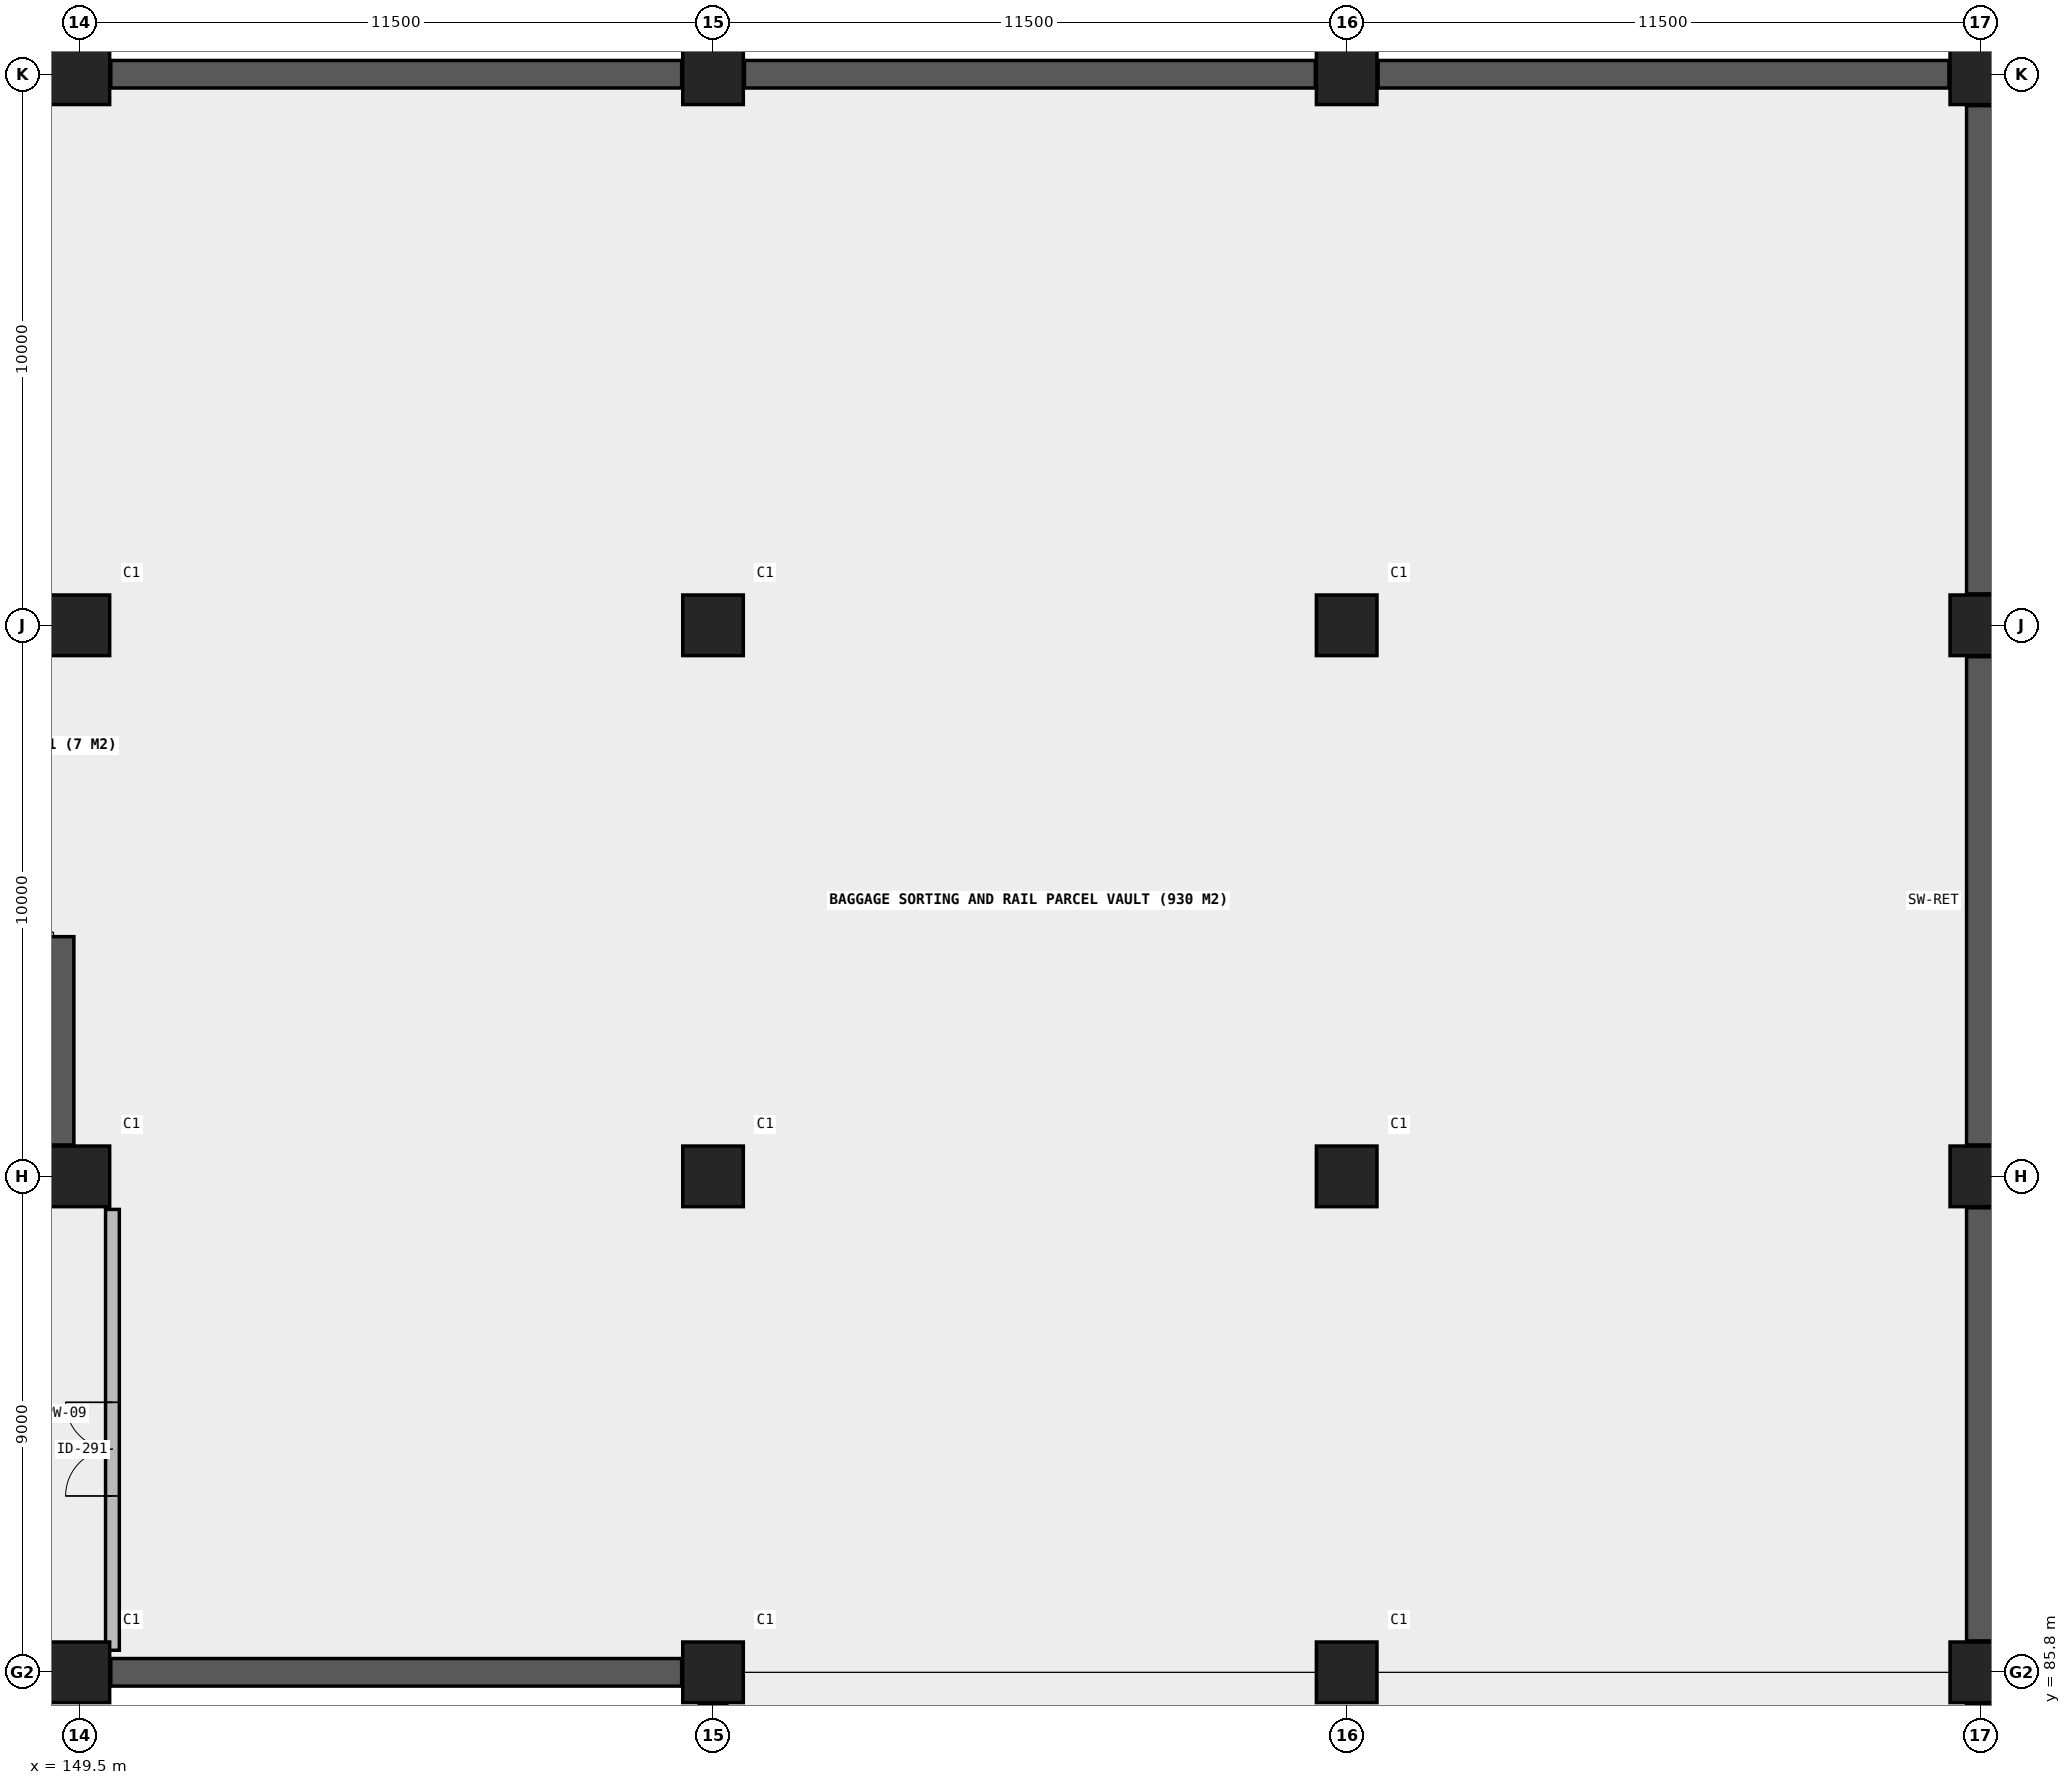
"""IFC4 building model, lengths in metres.
Left out: names, types, materials, properties, quantities, classifications, styles, units other than length and angle.
Written with IfcOpenShell. Run it as: python <this file> out.ifc"""

import sys

from ifc_helpers import new_model, si_unit, direction, frame, frame_2d, origin, origin_2d, place, context, subcontext, project, spatial, rectangle, extrude, element, fill, save


model = new_model("IFC4")
c1 = context("Model", 3, precision=1e-05, world=origin(), true_north=direction((0.0, 1.0)))
c2 = subcontext(c1, "Body", "Model", "MODEL_VIEW")
j1 = project(units=[si_unit("LENGTHUNIT", "METRE"), si_unit("PLANEANGLEUNIT", "RADIAN")], contexts=[c1])
p1 = place(None, origin())
s1 = spatial("IfcSite", under=j1, at=p1, CompositionType="ELEMENT")
p2 = place(p1, origin())
s2 = spatial("IfcBuilding", under=s1, at=p2, CompositionType="ELEMENT")
p3 = place(p2, frame((0.0, 0.0, -4.2)))
s3 = spatial("IfcBuildingStorey", under=s2, at=p3, CompositionType="ELEMENT", Elevation=-4.2)
for number, where, z_axis, x_axis in (
    (1, (149.5, 85.8, 0.0), (0.0, 0.0, 1.0), (1.0, 0.0, 0.0)),
    (2, (149.5, 94.8, 0.0), (0.0, 0.0, 1.0), (1.0, 0.0, 0.0)),
    (3, (149.5, 104.8, 0.0), (0.0, 0.0, 1.0), (1.0, 0.0, 0.0)),
    (4, (149.5, 114.8, 0.0), (0.0, 0.0, 1.0), (1.0, 0.0, 0.0)),
    (5, (161.0, 85.8, 0.0), (0.0, 0.0, 1.0), (1.0, 0.0, 0.0)),
    (6, (161.0, 94.8, 0.0), (0.0, 0.0, 1.0), (1.0, 0.0, 0.0)),
    (7, (161.0, 104.8, 0.0), (0.0, 0.0, 1.0), (1.0, 0.0, 0.0)),
    (8, (161.0, 114.8, 0.0), (0.0, 0.0, 1.0), (1.0, 0.0, 0.0)),
    (9, (172.5, 85.8, 0.0), (0.0, 0.0, 1.0), (1.0, 0.0, 0.0)),
    (10, (172.5, 94.8, 0.0), (0.0, 0.0, 1.0), (1.0, 0.0, 0.0)),
    (11, (172.5, 104.8, 0.0), (0.0, 0.0, 1.0), (1.0, 0.0, 0.0)),
    (12, (172.5, 114.8, 0.0), (0.0, 0.0, 1.0), (1.0, 0.0, 0.0)),
    (13, (184.0, 85.8, 0.0), (0.0, 0.0, 1.0), (1.0, 0.0, 0.0)),
    (14, (184.0, 94.8, 0.0), (0.0, 0.0, 1.0), (1.0, 0.0, 0.0)),
    (15, (184.0, 104.8, 0.0), (0.0, 0.0, 1.0), (1.0, 0.0, 0.0)),
    (16, (184.0, 114.8, 0.0), (0.0, 0.0, 1.0), (1.0, 0.0, 0.0)),
):
    element("IfcColumn", number, at=place(p3, frame(where, z_axis=z_axis, x_axis=x_axis)), inside=s3, PredefinedType="COLUMN", context=c2, shape_type="SweptSolid", body=[
        extrude(rectangle(XDim=1.1, YDim=1.1, at=origin_2d()), origin(), (0.0, 0.0, 1.0), 4.2),
    ])
p4 = place(p3, frame((184.0, 78.395, 0.0), z_axis=(0.0, 0.0, 1.0), x_axis=(0.0, 1.0, 0.0)))
e17 = element("IfcWall", 17, at=p4, inside=s3, PredefinedType="SHEAR", context=c2, shape_type="SweptSolid", body=[
    extrude(rectangle(XDim=6.835, YDim=0.5, at=frame_2d((3.417, 0.0))), origin(), (0.0, 0.0, 1.0), 4.2),
])
p5 = place(p3, frame((184.0, 86.37, 0.0), z_axis=(0.0, 0.0, 1.0), x_axis=(0.0, 1.0, 0.0)))
e18 = element("IfcWall", 18, at=p5, inside=s3, PredefinedType="SHEAR", context=c2, shape_type="SweptSolid", body=[
    extrude(rectangle(XDim=7.86, YDim=0.5, at=frame_2d((3.93, 0.0))), origin(), (0.0, 0.0, 1.0), 4.2),
])
for number, where, z_axis, x_axis in (
    (19, (184.0, 95.37, 0.0), (0.0, 0.0, 1.0), (0.0, 1.0, 0.0)),
    (20, (184.0, 105.37, 0.0), (0.0, 0.0, 1.0), (0.0, 1.0, 0.0)),
):
    element("IfcWall", number, at=place(p3, frame(where, z_axis=z_axis, x_axis=x_axis)), inside=s3, PredefinedType="SHEAR", context=c2, shape_type="SweptSolid", body=[
        extrude(rectangle(XDim=8.86, YDim=0.5, at=frame_2d((4.43, 0.0))), origin(), (0.0, 0.0, 1.0), 4.2),
    ])
p6 = place(p3, frame((161.0, 78.395, 0.0), z_axis=(0.0, 0.0, 1.0), x_axis=(0.0, 1.0, 0.0)))
e21 = element("IfcWall", 21, at=p6, inside=s3, PredefinedType="SHEAR", context=c2, shape_type="SweptSolid", body=[
    extrude(rectangle(XDim=6.835, YDim=0.5, at=frame_2d((3.417, 0.0))), origin(), (0.0, 0.0, 1.0), 4.2),
])
for number, where, z_axis, x_axis in (
    (22, (150.07, 85.8, 0.0), (0.0, 0.0, 1.0), (1.0, 0.0, 0.0)),
    (23, (150.07, 114.8, 0.0), (0.0, 0.0, 1.0), (1.0, 0.0, 0.0)),
    (24, (161.57, 114.8, 0.0), (0.0, 0.0, 1.0), (1.0, 0.0, 0.0)),
    (25, (173.07, 114.8, 0.0), (0.0, 0.0, 1.0), (1.0, 0.0, 0.0)),
):
    element("IfcWall", number, at=place(p3, frame(where, z_axis=z_axis, x_axis=x_axis)), inside=s3, PredefinedType="SHEAR", context=c2, shape_type="SweptSolid", body=[
        extrude(rectangle(XDim=10.36, YDim=0.5, at=frame_2d((5.18, 0.0))), origin(), (0.0, 0.0, 1.0), 4.2),
    ])
p7 = place(p3, frame((149.175, 95.37, 0.0), z_axis=(0.0, 0.0, 1.0), x_axis=(0.0, 1.0, 0.0)))
e26 = element("IfcWall", 26, at=p7, inside=s3, PredefinedType="SHEAR", context=c2, shape_type="SweptSolid", body=[
    extrude(rectangle(XDim=3.78, YDim=0.45, at=frame_2d((1.89, 0.0))), origin(), (0.0, 0.0, 1.0), 4.2),
])
p8 = place(p3, frame((150.1, 86.2, 0.0), z_axis=(0.0, 0.0, 1.0), x_axis=(0.0, 1.0, 0.0)))
e27 = element("IfcWall", 27, at=p8, inside=s3, PredefinedType="SOLIDWALL", context=c2, shape_type="SweptSolid", body=[
    extrude(rectangle(XDim=8.0, YDim=0.25, at=frame_2d((4.0, 0.0))), origin(), (0.0, 0.0, 1.0), 3.86),
])
p9 = place(p8, frame((2.8, 0.0, 0.0)))
e28 = element("IfcOpeningElement", 28, at=p9, cuts=e27, PredefinedType="OPENING", context=c2, shape_type="SweptSolid", body=[
    extrude(rectangle(XDim=1.7, YDim=2.25, at=frame_2d((0.85, 1.125))), frame((0.0, 0.135, 0.0), z_axis=(0.0, -1.0, 0.0), x_axis=(1.0, 0.0, 0.0)), (0.0, 0.0, 1.0), 0.27),
])
p10 = place(p9, origin())
e29 = element("IfcDoor", 29, at=p10, inside=s3, OperationType="DOUBLE_DOOR_SINGLE_SWING", PredefinedType="DOOR", context=c2, shape_type="SweptSolid", body=[
    extrude(rectangle(XDim=1.7, YDim=2.25, at=frame_2d((0.85, 1.125))), frame((0.0, 0.025, 0.0), z_axis=(0.0, -1.0, 0.0), x_axis=(1.0, 0.0, 0.0)), (0.0, 0.0, 1.0), 0.05),
])
fill(e28, e29)
save(model, sys.argv[1])
